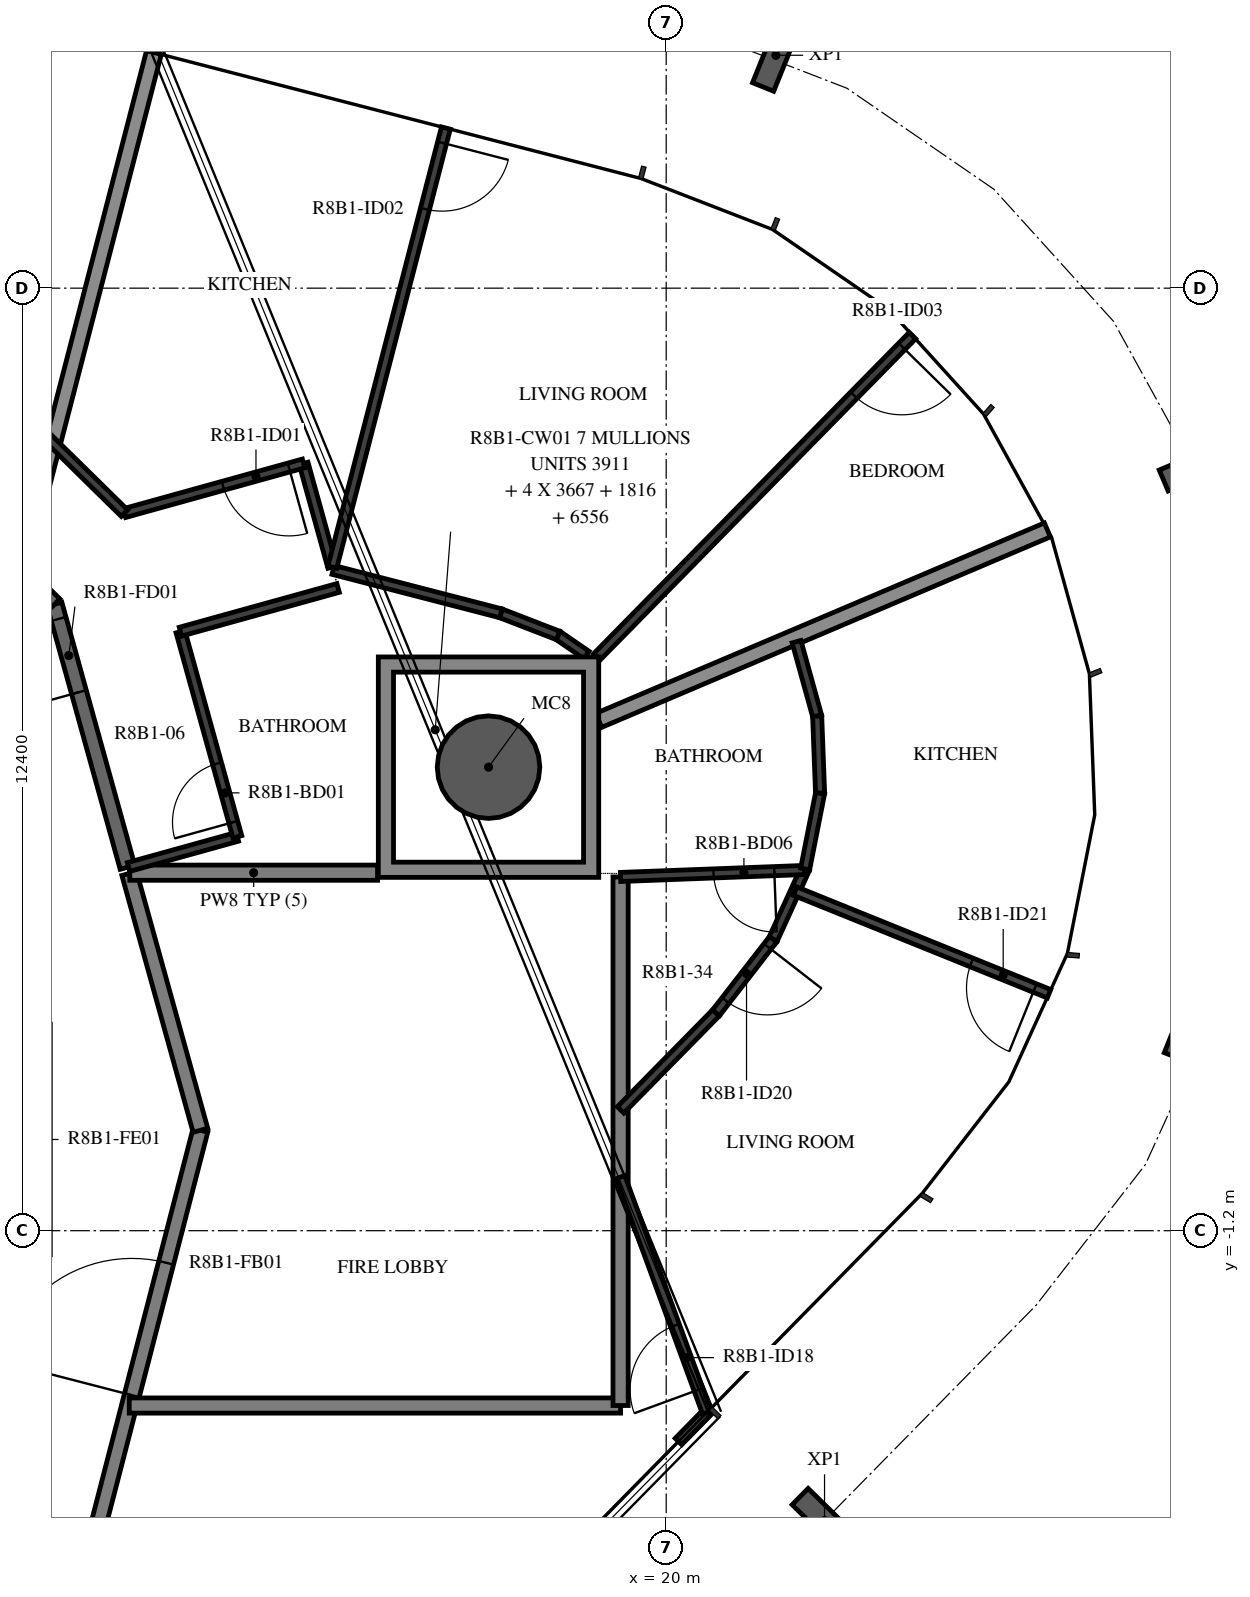
"""IFC4 building model, lengths in metres.
Left out: names, types, materials, properties, quantities, classifications, styles, units other than length and angle.
Written with IfcOpenShell. Run it as: python <this file> out.ifc"""

import sys

from ifc_helpers import new_model, si_unit, direction, frame, frame_2d, origin, origin_2d, place, context, subcontext, project, spatial, polyline, rectangle, hollow_circle, i_section, outline, extrude, element, fill, save


model = new_model("IFC4")
c1 = context("Model", 3, precision=1e-05, world=origin(), true_north=direction((0.0, 1.0)))
c2 = subcontext(c1, "Body", "Model", "MODEL_VIEW")
j1 = project(units=[si_unit("LENGTHUNIT", "METRE"), si_unit("PLANEANGLEUNIT", "RADIAN")], contexts=[c1])
p1 = place(None, origin())
s1 = spatial("IfcSite", under=j1, at=p1, CompositionType="ELEMENT")
p2 = place(p1, origin())
s2 = spatial("IfcBuilding", under=s1, at=p2, CompositionType="ELEMENT")
p3 = place(p2, frame((0.0, 0.0, 308.7)))
s3 = spatial("IfcBuildingStorey", under=s2, at=p3, CompositionType="ELEMENT", Elevation=308.7)
p4 = place(p3, frame((17.663, 4.898, -0.38), z_axis=(0.0, 0.0, 1.0), x_axis=(1.0, 0.0, 0.0)))
e1 = element("IfcColumn", 1, at=p4, inside=s3, PredefinedType="COLUMN", context=c2, shape_type="SweptSolid", body=[
    extrude(hollow_circle(Radius=0.675, WallThickness=0.03, at=origin_2d()), origin(), (0.0, 0.0, 1.0), 3.5),
])
for number, where, z_axis, x_axis in (
    (2, (22.083, -5.013, -0.38), (0.0, 0.0, 1.0), (-0.701, -0.713, 0.0)),
    (3, (27.026, 1.113, -0.38), (0.0, 0.0, 1.0), (-0.375, -0.927, 0.0)),
    (4, (26.96, 8.845, -0.38), (0.0, 0.0, 1.0), (0.391, -0.92, 0.0)),
    (5, (21.443, 14.264, -0.38), (0.0, 0.0, 1.0), (0.927, -0.374, 0.0)),
):
    element("IfcColumn", number, at=place(p3, frame(where, z_axis=z_axis, x_axis=x_axis)), inside=s3, PredefinedType="COLUMN", context=c2, shape_type="SweptSolid", body=[
        extrude(i_section(OverallWidth=0.3, OverallDepth=0.9, WebThickness=0.019, FlangeThickness=0.035, FilletRadius=0.03, at=origin_2d()), origin(), (0.0, 0.0, 1.0), 3.5),
    ])
p5 = place(p3, frame((12.074, -6.831, 0.0), z_axis=(0.0, 0.0, 1.0), x_axis=(0.250391063186, 0.968144780225, 0.0)))
e6 = element("IfcWall", 6, at=p5, inside=s3, PredefinedType="STANDARD", context=c2, shape_type="SweptSolid", body=[
    extrude(rectangle(XDim=7.181, YDim=0.2, at=frame_2d((3.591, 0.0))), origin(), (0.0, 0.0, 1.0), 3.12),
])
p6 = place(p5, frame((3.581, 0.0, 0.0)))
e7 = element("IfcOpeningElement", 7, at=p6, cuts=e6, PredefinedType="OPENING", context=c2, shape_type="SweptSolid", body=[
    extrude(rectangle(XDim=1.8, YDim=2.1, at=frame_2d((0.9, 1.05))), frame((0.0, 0.11, 0.0), z_axis=(0.0, -1.0, 0.0), x_axis=(1.0, 0.0, 0.0)), (0.0, 0.0, 1.0), 0.22),
])
p7 = place(p3, frame((13.872, 0.121, 0.0), z_axis=(0.0, 0.0, 1.0), x_axis=(-0.267291928416, 0.963615600228, 0.0)))
e8 = element("IfcWall", 8, at=p7, inside=s3, PredefinedType="STANDARD", context=c2, shape_type="SweptSolid", body=[
    extrude(rectangle(XDim=3.507, YDim=0.2, at=frame_2d((1.753, 0.0))), origin(), (0.0, 0.0, 1.0), 3.12),
])
p8 = place(p3, frame((12.913, 3.581, 0.0), z_axis=(0.0, 0.0, 1.0), x_axis=(-0.267223005422, 0.963634715737, 0.0)))
e9 = element("IfcWall", 9, at=p8, inside=s3, PredefinedType="STANDARD", context=c2, shape_type="SweptSolid", body=[
    extrude(rectangle(XDim=3.591, YDim=0.2, at=frame_2d((1.795, 0.0))), origin(), (0.0, 0.0, 1.0), 3.12),
])
p9 = place(p8, frame((2.39, 0.0, 0.0)))
e10 = element("IfcOpeningElement", 10, at=p9, cuts=e9, PredefinedType="OPENING", context=c2, shape_type="SweptSolid", body=[
    extrude(rectangle(XDim=1.0, YDim=2.1, at=frame_2d((0.5, 1.05))), frame((0.0, 0.11, 0.0), z_axis=(0.0, -1.0, 0.0), x_axis=(1.0, 0.0, 0.0)), (0.0, 0.0, 1.0), 0.22),
])
p10 = place(p3, frame((11.953, 7.041, 0.0), z_axis=(0.0, 0.0, 1.0), x_axis=(-0.713250549143, 0.70090916255, 0.0)))
e11 = element("IfcWall", 11, at=p10, inside=s3, PredefinedType="STANDARD", context=c2, shape_type="SweptSolid", body=[
    extrude(rectangle(XDim=7.181, YDim=0.2, at=frame_2d((3.59, 0.0))), origin(), (0.0, 0.0, 1.0), 3.12),
])
p11 = place(p10, frame((2.637, 0.0, 0.0)))
e12 = element("IfcOpeningElement", 12, at=p11, cuts=e11, PredefinedType="OPENING", context=c2, shape_type="SweptSolid", body=[
    extrude(rectangle(XDim=1.0, YDim=2.1, at=frame_2d((0.5, 1.05))), frame((0.0, 0.11, 0.0), z_axis=(0.0, -1.0, 0.0), x_axis=(1.0, 0.0, 0.0)), (0.0, 0.0, 1.0), 0.22),
])
p12 = place(p3, frame((16.203, 3.51, 0.0), z_axis=(0.0, 0.0, 1.0), x_axis=(-1.0, 0.0, 0.0)))
e13 = element("IfcWall", 13, at=p12, inside=s3, PredefinedType="STANDARD", context=c2, shape_type="SweptSolid", body=[
    extrude(rectangle(XDim=3.26, YDim=0.2, at=frame_2d((1.63, 0.0))), origin(), (0.0, 0.0, 1.0), 3.12),
])
p13 = place(p3, frame((12.936, -3.5, 0.0), z_axis=(0.0, 0.0, 1.0), x_axis=(1.0, 0.0, 0.0)))
e14 = element("IfcWall", 14, at=p13, inside=s3, PredefinedType="STANDARD", context=c2, shape_type="SweptSolid", body=[
    extrude(rectangle(XDim=6.464, YDim=0.2, at=frame_2d((3.232, 0.0))), origin(), (0.0, 0.0, 1.0), 3.12),
])
p14 = place(p3, frame((19.4, -3.5, 0.0), z_axis=(0.0, 0.0, 1.0), x_axis=(0.0, 1.0, 0.0)))
e15 = element("IfcWall", 15, at=p14, inside=s3, PredefinedType="STANDARD", context=c2, shape_type="SweptSolid", body=[
    extrude(rectangle(XDim=6.954, YDim=0.2, at=frame_2d((3.477, 0.0))), origin(), (0.0, 0.0, 1.0), 3.12),
])
p15 = place(p3, frame((13.26, 14.3, 0.0), z_axis=(0.0, 0.0, 1.0), x_axis=(-0.250397400042, -0.968143141303, 0.0)))
e16 = element("IfcWall", 16, at=p15, inside=s3, PredefinedType="STANDARD", context=c2, shape_type="SweptSolid", body=[
    extrude(rectangle(XDim=7.037, YDim=0.2, at=frame_2d((3.518, 0.0))), origin(), (0.0, 0.0, 1.0), 2.73),
])
p16 = place(p3, frame((19.113, 5.514, 0.0), z_axis=(0.0, 0.0, 1.0), x_axis=(0.920500452946, 0.390741495269, 0.0)))
e17 = element("IfcWall", 17, at=p16, inside=s3, PredefinedType="STANDARD", context=c2, shape_type="SweptSolid", body=[
    extrude(rectangle(XDim=6.412, YDim=0.2, at=frame_2d((3.206, 0.0))), origin(), (0.0, 0.0, 1.0), 2.73),
])
p17 = place(p3, frame((12.927, 3.585, 0.0), z_axis=(0.0, 0.0, 1.0), x_axis=(0.963616756608, 0.26728775951, 0.0)))
e18 = element("IfcWall", 18, at=p17, inside=s3, PredefinedType="PARTITIONING", context=c2, shape_type="SweptSolid", body=[
    extrude(rectangle(XDim=1.485, YDim=0.12, at=frame_2d((0.743, 0.0))), origin(), (0.0, 0.0, 1.0), 3.12),
])
p18 = place(p3, frame((14.358, 3.982, 0.0), z_axis=(0.0, 0.0, 1.0), x_axis=(-0.267275166053, 0.963620249689, 0.0)))
e19 = element("IfcWall", 19, at=p18, inside=s3, PredefinedType="PARTITIONING", context=c2, shape_type="SweptSolid", body=[
    extrude(rectangle(XDim=2.801, YDim=0.12, at=frame_2d((1.4, 0.0))), origin(), (0.0, 0.0, 1.0), 3.12),
])
p19 = place(p18, frame((0.2, 0.0, 0.0)))
e20 = element("IfcOpeningElement", 20, at=p19, cuts=e19, PredefinedType="OPENING", context=c2, shape_type="SweptSolid", body=[
    extrude(rectangle(XDim=0.8, YDim=2.1, at=frame_2d((0.4, 1.05))), frame((0.0, 0.07, 0.0), z_axis=(0.0, -1.0, 0.0), x_axis=(1.0, 0.0, 0.0)), (0.0, 0.0, 1.0), 0.14),
])
p20 = place(p3, frame((13.61, 6.681, 0.0), z_axis=(0.0, 0.0, 1.0), x_axis=(0.963626714087, 0.267251858551, 0.0)))
e21 = element("IfcWall", 21, at=p20, inside=s3, PredefinedType="PARTITIONING", context=c2, shape_type="SweptSolid", body=[
    extrude(rectangle(XDim=2.152, YDim=0.12, at=frame_2d((1.076, 0.0))), origin(), (0.0, 0.0, 1.0), 3.12),
])
p21 = place(p3, frame((15.608, 7.53, 0.0), z_axis=(0.0, 0.0, 1.0), x_axis=(-0.267172351994, 0.963648760872, 0.0)))
e22 = element("IfcWall", 22, at=p21, inside=s3, PredefinedType="PARTITIONING", context=c2, shape_type="SweptSolid", body=[
    extrude(rectangle(XDim=1.416, YDim=0.12, at=frame_2d((0.708, 0.0))), origin(), (0.0, 0.0, 1.0), 3.12),
])
p22 = place(p3, frame((15.229, 8.894, 0.0), z_axis=(0.0, 0.0, 1.0), x_axis=(-0.96363793677, -0.267211389759, 0.0)))
e23 = element("IfcWall", 23, at=p22, inside=s3, PredefinedType="PARTITIONING", context=c2, shape_type="SweptSolid", body=[
    extrude(rectangle(XDim=2.446, YDim=0.12, at=frame_2d((1.223, 0.0))), origin(), (0.0, 0.0, 1.0), 3.12),
])
p23 = place(p22, frame((0.2, 0.0, 0.0)))
e24 = element("IfcOpeningElement", 24, at=p23, cuts=e23, PredefinedType="OPENING", context=c2, shape_type="SweptSolid", body=[
    extrude(rectangle(XDim=0.9, YDim=2.1, at=frame_2d((0.45, 1.05))), frame((0.0, 0.07, 0.0), z_axis=(0.0, -1.0, 0.0), x_axis=(1.0, 0.0, 0.0)), (0.0, 0.0, 1.0), 0.14),
])
p24 = place(p3, frame((12.873, 8.24, 0.0), z_axis=(0.0, 0.0, 1.0), x_axis=(-0.713251042219, 0.700908660792, 0.0)))
e25 = element("IfcWall", 25, at=p24, inside=s3, PredefinedType="PARTITIONING", context=c2, shape_type="SweptSolid", body=[
    extrude(rectangle(XDim=7.398, YDim=0.12, at=frame_2d((3.699, 0.0))), origin(), (0.0, 0.0, 1.0), 3.12),
])
p25 = place(p24, frame((1.718, 0.0, 0.0)))
e26 = element("IfcOpeningElement", 26, at=p25, cuts=e25, PredefinedType="OPENING", context=c2, shape_type="SweptSolid", body=[
    extrude(rectangle(XDim=0.9, YDim=2.1, at=frame_2d((0.45, 1.05))), frame((0.0, 0.07, 0.0), z_axis=(0.0, -1.0, 0.0), x_axis=(1.0, 0.0, 0.0)), (0.0, 0.0, 1.0), 0.14),
])
p26 = place(p3, frame((23.24, 10.576, 0.0), z_axis=(0.0, 0.0, 1.0), x_axis=(-0.700776156398, -0.713381229515, 0.0)))
e27 = element("IfcWall", 27, at=p26, inside=s3, PredefinedType="PARTITIONING", context=c2, shape_type="SweptSolid", body=[
    extrude(rectangle(XDim=5.927, YDim=0.12, at=frame_2d((2.963, 0.0))), origin(), (0.0, 0.0, 1.0), 3.12),
])
p27 = place(p26, frame((0.2, 0.0, 0.0)))
e28 = element("IfcOpeningElement", 28, at=p27, cuts=e27, PredefinedType="OPENING", context=c2, shape_type="SweptSolid", body=[
    extrude(rectangle(XDim=0.9, YDim=2.1, at=frame_2d((0.45, 1.05))), frame((0.0, 0.07, 0.0), z_axis=(0.0, -1.0, 0.0), x_axis=(1.0, 0.0, 0.0)), (0.0, 0.0, 1.0), 0.14),
])
p28 = place(p3, frame((18.952, 6.373, 0.0), z_axis=(0.0, 0.0, 1.0), x_axis=(-0.82412024189, 0.566414889377, 0.0)))
e29 = element("IfcWall", 29, at=p28, inside=s3, PredefinedType="PARTITIONING", context=c2, shape_type="SweptSolid", body=[
    extrude(rectangle(XDim=0.455, YDim=0.12, at=frame_2d((0.228, 0.0))), origin(), (0.0, 0.0, 1.0), 3.12),
])
p29 = place(p3, frame((18.577, 6.631, 0.0), z_axis=(0.0, 0.0, 1.0), x_axis=(-0.932531937323, 0.361087504455, 0.0)))
e30 = element("IfcWall", 30, at=p29, inside=s3, PredefinedType="PARTITIONING", context=c2, shape_type="SweptSolid", body=[
    extrude(rectangle(XDim=0.807, YDim=0.12, at=frame_2d((0.403, 0.0))), origin(), (0.0, 0.0, 1.0), 3.12),
])
p30 = place(p3, frame((17.825, 6.922, 0.0), z_axis=(0.0, 0.0, 1.0), x_axis=(-0.968151834511, 0.250363785985, 0.0)))
e31 = element("IfcWall", 31, at=p30, inside=s3, PredefinedType="PARTITIONING", context=c2, shape_type="SweptSolid", body=[
    extrude(rectangle(XDim=2.28, YDim=0.12, at=frame_2d((1.14, 0.0))), origin(), (0.0, 0.0, 1.0), 3.12),
])
p31 = place(p3, frame((17.102, 13.307, 0.0), z_axis=(0.0, 0.0, 1.0), x_axis=(-0.250374225748, -0.968149134731, 0.0)))
e32 = element("IfcWall", 32, at=p31, inside=s3, PredefinedType="PARTITIONING", context=c2, shape_type="SweptSolid", body=[
    extrude(rectangle(XDim=5.967, YDim=0.12, at=frame_2d((2.983, 0.0))), origin(), (0.0, 0.0, 1.0), 3.12),
])
p32 = place(p31, frame((0.2, 0.0, 0.0)))
e33 = element("IfcOpeningElement", 33, at=p32, cuts=e32, PredefinedType="OPENING", context=c2, shape_type="SweptSolid", body=[
    extrude(rectangle(XDim=0.9, YDim=2.1, at=frame_2d((0.45, 1.05))), frame((0.0, 0.07, 0.0), z_axis=(0.0, -1.0, 0.0), x_axis=(1.0, 0.0, 0.0)), (0.0, 0.0, 1.0), 0.14),
])
p33 = place(p3, frame((20.566, -3.561, 0.0), z_axis=(0.0, 0.0, 1.0), x_axis=(-0.700950066256, -0.713210350889, 0.0)))
e34 = element("IfcWall", 34, at=p33, inside=s3, PredefinedType="PARTITIONING", context=c2, shape_type="SweptSolid", body=[
    extrude(rectangle(XDim=0.577, YDim=0.12, at=frame_2d((0.289, 0.0))), origin(), (0.0, 0.0, 1.0), 3.12),
])
p34 = place(p3, frame((20.535, -3.593, 0.0), z_axis=(0.0, 0.0, 1.0), x_axis=(-0.344065452993, 0.93894566619, 0.0)))
e35 = element("IfcWall", 35, at=p34, inside=s3, PredefinedType="PARTITIONING", context=c2, shape_type="SweptSolid", body=[
    extrude(rectangle(XDim=3.299, YDim=0.12, at=frame_2d((1.649, 0.0))), origin(), (0.0, 0.0, 1.0), 3.12),
])
p35 = place(p34, frame((0.32, 0.0, 0.0)))
e36 = element("IfcOpeningElement", 36, at=p35, cuts=e35, PredefinedType="OPENING", context=c2, shape_type="SweptSolid", body=[
    extrude(rectangle(XDim=0.9, YDim=2.1, at=frame_2d((0.45, 1.05))), frame((0.0, 0.07, 0.0), z_axis=(0.0, -1.0, 0.0), x_axis=(1.0, 0.0, 0.0)), (0.0, 0.0, 1.0), 0.14),
])
p36 = place(p3, frame((21.828, 3.558, 0.0), z_axis=(0.0, 0.0, 1.0), x_axis=(-0.414726005229, -0.909946339399, 0.0)))
e37 = element("IfcWall", 37, at=p36, inside=s3, PredefinedType="PARTITIONING", context=c2, shape_type="SweptSolid", body=[
    extrude(rectangle(XDim=1.016, YDim=0.12, at=frame_2d((0.508, 0.0))), origin(), (0.0, 0.0, 1.0), 3.12),
])
p37 = place(p3, frame((21.406, 2.634, 0.0), z_axis=(0.0, 0.0, 1.0), x_axis=(-0.613444581667, -0.789737769911, 0.0)))
e38 = element("IfcWall", 38, at=p37, inside=s3, PredefinedType="PARTITIONING", context=c2, shape_type="SweptSolid", body=[
    extrude(rectangle(XDim=1.227, YDim=0.12, at=frame_2d((0.614, 0.0))), origin(), (0.0, 0.0, 1.0), 3.12),
])
p38 = place(p37, frame((0.12, 0.0, 0.0)))
e39 = element("IfcOpeningElement", 39, at=p38, cuts=e38, PredefinedType="OPENING", context=c2, shape_type="SweptSolid", body=[
    extrude(rectangle(XDim=0.9, YDim=2.1, at=frame_2d((0.45, 1.05))), frame((0.0, 0.07, 0.0), z_axis=(0.0, -1.0, 0.0), x_axis=(1.0, 0.0, 0.0)), (0.0, 0.0, 1.0), 0.14),
])
p39 = place(p3, frame((20.654, 1.665, 0.0), z_axis=(0.0, 0.0, 1.0), x_axis=(-0.700870484553, -0.713288555833, 0.0)))
e40 = element("IfcWall", 40, at=p39, inside=s3, PredefinedType="PARTITIONING", context=c2, shape_type="SweptSolid", body=[
    extrude(rectangle(XDim=1.789, YDim=0.12, at=frame_2d((0.895, 0.0))), origin(), (0.0, 0.0, 1.0), 3.12),
])
p40 = place(p3, frame((25.036, 1.917, 0.0), z_axis=(0.0, 0.0, 1.0), x_axis=(-0.927096540393, 0.374822631108, 0.0)))
e41 = element("IfcWall", 41, at=p40, inside=s3, PredefinedType="PARTITIONING", context=c2, shape_type="SweptSolid", body=[
    extrude(rectangle(XDim=3.603, YDim=0.12, at=frame_2d((1.802, 0.0))), origin(), (0.0, 0.0, 1.0), 2.73),
])
p41 = place(p40, frame((0.2, 0.0, 0.0)))
e42 = element("IfcOpeningElement", 42, at=p41, cuts=e41, PredefinedType="OPENING", context=c2, shape_type="SweptSolid", body=[
    extrude(rectangle(XDim=0.9, YDim=2.1, at=frame_2d((0.45, 1.05))), frame((0.0, 0.07, 0.0), z_axis=(0.0, -1.0, 0.0), x_axis=(1.0, 0.0, 0.0)), (0.0, 0.0, 1.0), 0.14),
])
p42 = place(p3, frame((21.822, 3.545, 0.0), z_axis=(0.0, 0.0, 1.0), x_axis=(-0.999286397149, -0.037771635816, 0.0)))
e43 = element("IfcWall", 43, at=p42, inside=s3, PredefinedType="PARTITIONING", context=c2, shape_type="SweptSolid", body=[
    extrude(rectangle(XDim=2.424, YDim=0.12, at=frame_2d((1.212, 0.0))), origin(), (0.0, 0.0, 1.0), 3.12),
])
p43 = place(p42, frame((0.4, 0.0, 0.0)))
e44 = element("IfcOpeningElement", 44, at=p43, cuts=e43, PredefinedType="OPENING", context=c2, shape_type="SweptSolid", body=[
    extrude(rectangle(XDim=0.8, YDim=2.1, at=frame_2d((0.4, 1.05))), frame((0.0, 0.07, 0.0), z_axis=(0.0, -1.0, 0.0), x_axis=(1.0, 0.0, 0.0)), (0.0, 0.0, 1.0), 0.14),
])
for number, where, z_axis, x_axis in (
    (45, (21.715, 6.549, 0.0), (0.0, 0.0, 1.0), (0.267, -0.964, 0.0)),
    (46, (21.986, 5.57, 0.0), (0.0, 0.0, 1.0), (0.038, -0.999, 0.0)),
    (47, (22.025, 4.555, 0.0), (0.0, 0.0, 1.0), (-0.194, -0.981, 0.0)),
):
    element("IfcWall", number, at=place(p3, frame(where, z_axis=z_axis, x_axis=x_axis)), inside=s3, PredefinedType="PARTITIONING", context=c2, shape_type="SweptSolid", body=[
        extrude(rectangle(XDim=1.016, YDim=0.12, at=frame_2d((0.508, 0.0))), origin(), (0.0, 0.0, 1.0), 3.12),
    ])
p44 = place(p3, origin())
e48 = element("IfcWall", 48, at=p44, inside=s3, PredefinedType="STANDARD", context=c2, shape_type="SweptSolid", body=[
    extrude(outline(polyline([(19.113, 6.348), (19.113, 3.448), (16.213, 3.448), (16.213, 6.348), (19.113, 6.348)]), holes=[polyline([(16.413, 3.648), (18.913, 3.648), (18.913, 6.148), (16.413, 6.148), (16.413, 3.648)])]), origin(), (0.0, 0.0, 1.0), 3.12),
])
p45 = place(p9, origin())
e49 = element("IfcDoor", 49, at=p45, inside=s3, OperationType="SINGLE_SWING_LEFT", PredefinedType="DOOR", context=c2, shape_type="SweptSolid", body=[
    extrude(rectangle(XDim=1.0, YDim=2.1, at=frame_2d((0.5, 1.05))), frame((0.0, 0.025, 0.0), z_axis=(0.0, -1.0, 0.0), x_axis=(1.0, 0.0, 0.0)), (0.0, 0.0, 1.0), 0.05),
])
fill(e10, e49)
p46 = place(p19, origin())
e50 = element("IfcDoor", 50, at=p46, inside=s3, OperationType="SINGLE_SWING_LEFT", PredefinedType="DOOR", context=c2, shape_type="SweptSolid", body=[
    extrude(rectangle(XDim=0.8, YDim=2.1, at=frame_2d((0.4, 1.05))), frame((0.0, 0.025, 0.0), z_axis=(0.0, -1.0, 0.0), x_axis=(1.0, 0.0, 0.0)), (0.0, 0.0, 1.0), 0.05),
])
fill(e20, e50)
p47 = place(p23, origin())
e51 = element("IfcDoor", 51, at=p47, inside=s3, OperationType="SINGLE_SWING_LEFT", PredefinedType="DOOR", context=c2, shape_type="SweptSolid", body=[
    extrude(rectangle(XDim=0.9, YDim=2.1, at=frame_2d((0.45, 1.05))), frame((0.0, 0.025, 0.0), z_axis=(0.0, -1.0, 0.0), x_axis=(1.0, 0.0, 0.0)), (0.0, 0.0, 1.0), 0.05),
])
fill(e24, e51)
p48 = place(p32, origin())
e52 = element("IfcDoor", 52, at=p48, inside=s3, OperationType="SINGLE_SWING_LEFT", PredefinedType="DOOR", context=c2, shape_type="SweptSolid", body=[
    extrude(rectangle(XDim=0.9, YDim=2.1, at=frame_2d((0.45, 1.05))), frame((0.0, 0.025, 0.0), z_axis=(0.0, -1.0, 0.0), x_axis=(1.0, 0.0, 0.0)), (0.0, 0.0, 1.0), 0.05),
])
fill(e33, e52)
p49 = place(p27, origin())
e53 = element("IfcDoor", 53, at=p49, inside=s3, OperationType="SINGLE_SWING_LEFT", PredefinedType="DOOR", context=c2, shape_type="SweptSolid", body=[
    extrude(rectangle(XDim=0.9, YDim=2.1, at=frame_2d((0.45, 1.05))), frame((0.0, 0.025, 0.0), z_axis=(0.0, -1.0, 0.0), x_axis=(1.0, 0.0, 0.0)), (0.0, 0.0, 1.0), 0.05),
])
fill(e28, e53)
p50 = place(p35, origin())
e54 = element("IfcDoor", 54, at=p50, inside=s3, OperationType="SINGLE_SWING_RIGHT", PredefinedType="DOOR", context=c2, shape_type="SweptSolid", body=[
    extrude(rectangle(XDim=0.9, YDim=2.1, at=frame_2d((0.45, 1.05))), frame((0.0, 0.025, 0.0), z_axis=(0.0, -1.0, 0.0), x_axis=(1.0, 0.0, 0.0)), (0.0, 0.0, 1.0), 0.05),
])
fill(e36, e54)
p51 = place(p38, origin())
e55 = element("IfcDoor", 55, at=p51, inside=s3, OperationType="SINGLE_SWING_RIGHT", PredefinedType="DOOR", context=c2, shape_type="SweptSolid", body=[
    extrude(rectangle(XDim=0.9, YDim=2.1, at=frame_2d((0.45, 1.05))), frame((0.0, 0.025, 0.0), z_axis=(0.0, -1.0, 0.0), x_axis=(1.0, 0.0, 0.0)), (0.0, 0.0, 1.0), 0.05),
])
fill(e39, e55)
p52 = place(p43, origin())
e56 = element("IfcDoor", 56, at=p52, inside=s3, OperationType="SINGLE_SWING_RIGHT", PredefinedType="DOOR", context=c2, shape_type="SweptSolid", body=[
    extrude(rectangle(XDim=0.8, YDim=2.1, at=frame_2d((0.4, 1.05))), frame((0.0, 0.025, 0.0), z_axis=(0.0, -1.0, 0.0), x_axis=(1.0, 0.0, 0.0)), (0.0, 0.0, 1.0), 0.05),
])
fill(e44, e56)
p53 = place(p41, origin())
e57 = element("IfcDoor", 57, at=p53, inside=s3, OperationType="SINGLE_SWING_RIGHT", PredefinedType="DOOR", context=c2, shape_type="SweptSolid", body=[
    extrude(rectangle(XDim=0.9, YDim=2.1, at=frame_2d((0.45, 1.05))), frame((0.0, 0.025, 0.0), z_axis=(0.0, -1.0, 0.0), x_axis=(1.0, 0.0, 0.0)), (0.0, 0.0, 1.0), 0.05),
])
fill(e42, e57)
p54 = place(p6, origin())
e58 = element("IfcDoor", 58, at=p54, inside=s3, OperationType="DOUBLE_DOOR_SINGLE_SWING", PredefinedType="DOOR", context=c2, shape_type="SweptSolid", body=[
    extrude(rectangle(XDim=1.8, YDim=2.1, at=frame_2d((0.9, 1.05))), frame((0.0, 0.025, 0.0), z_axis=(0.0, -1.0, 0.0), x_axis=(1.0, 0.0, 0.0)), (0.0, 0.0, 1.0), 0.05),
])
fill(e7, e58)
save(model, sys.argv[1])
